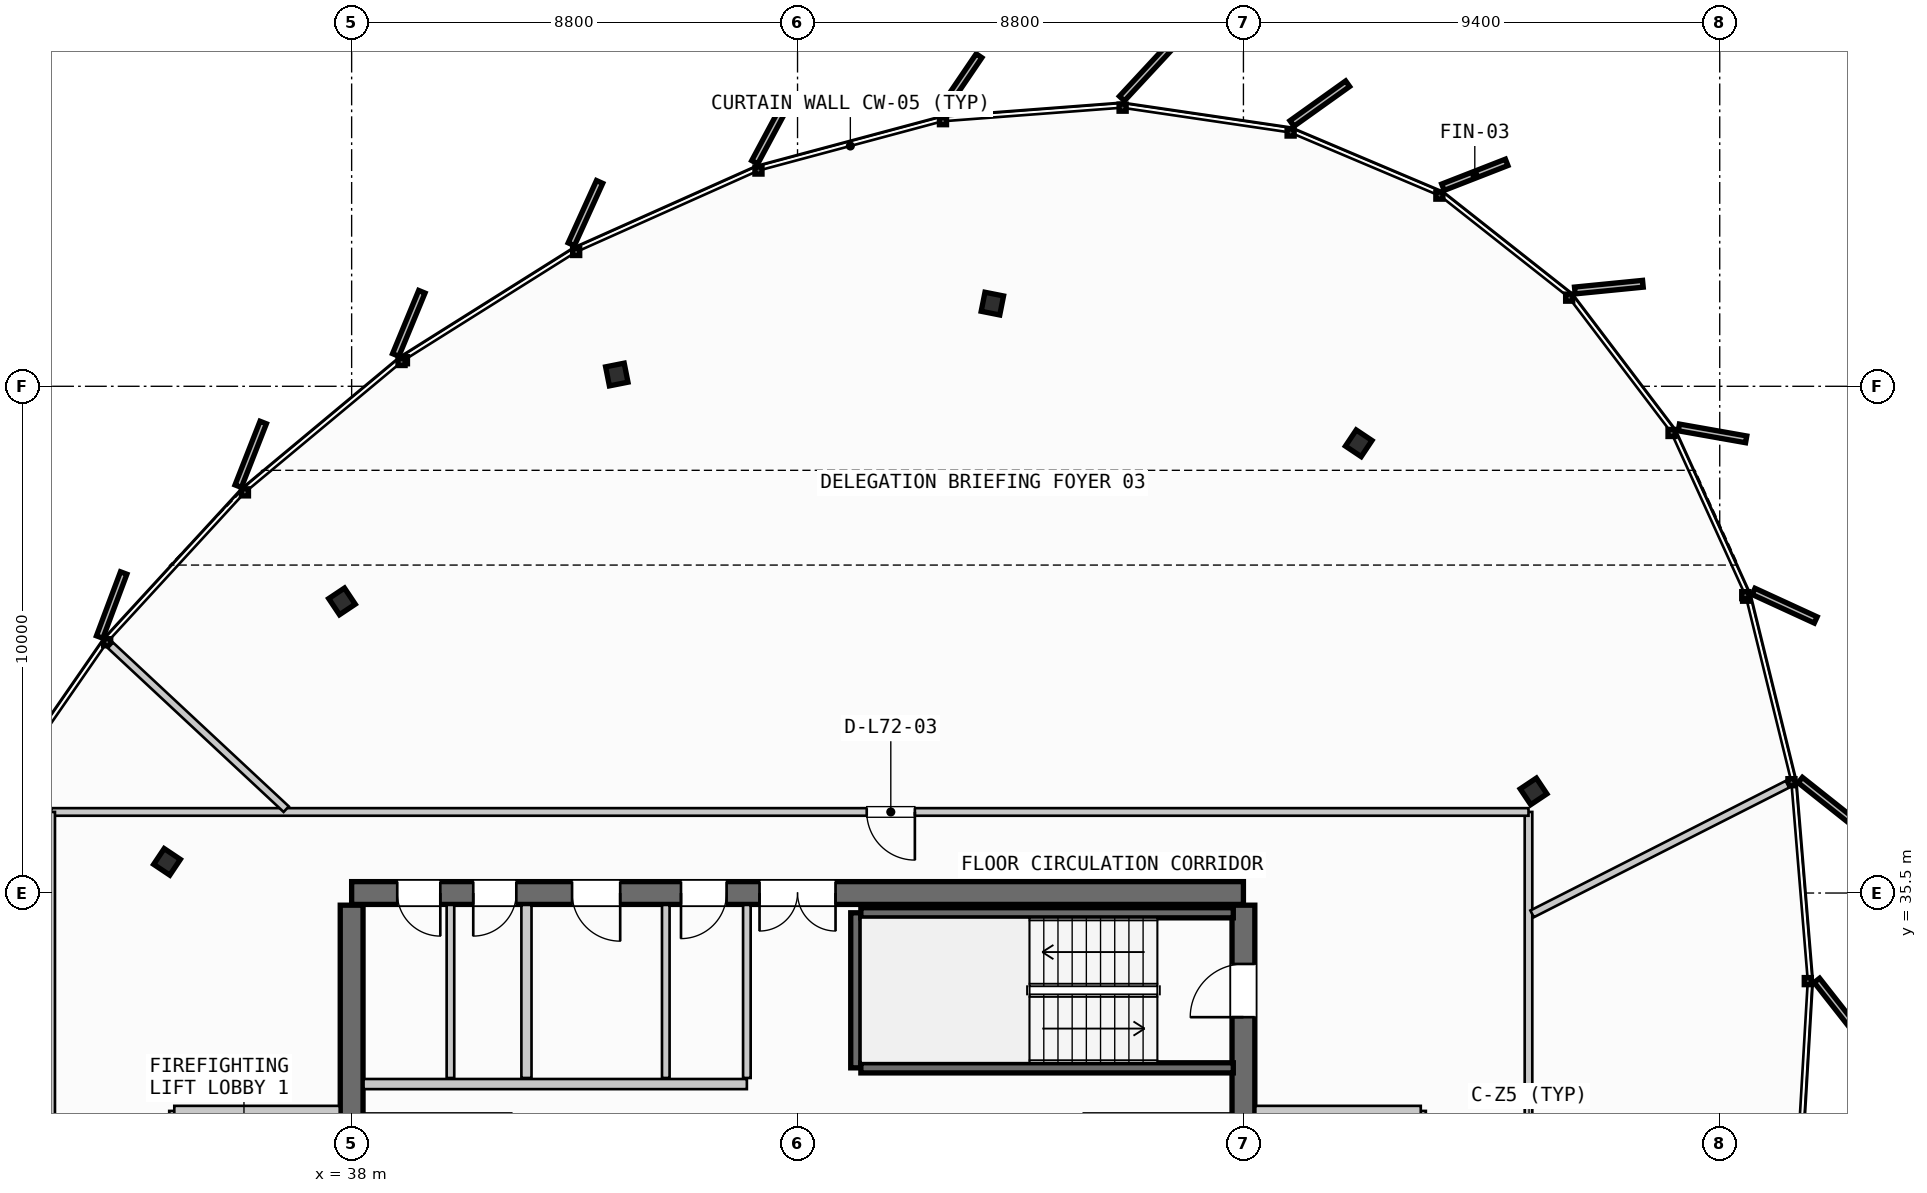
"""IFC4 building model, lengths in metres.
Left out: names, types, materials, properties, quantities, classifications, styles, units other than length and angle.
Written with IfcOpenShell. Run it as: python <this file> out.ifc"""

import sys

from ifc_helpers import new_model, si_unit, direction, frame, frame_2d, origin, origin_2d, place, context, subcontext, project, spatial, rectangle, i_section, extrude, source, transform, mapped, element, fill, save


model = new_model("IFC4")
c1 = context("Model", 3, precision=1e-05, world=origin(), true_north=direction((0.0, 1.0)))
c2 = subcontext(c1, "Body", "Model", "MODEL_VIEW")
j1 = project(units=[si_unit("LENGTHUNIT", "METRE"), si_unit("PLANEANGLEUNIT", "RADIAN")], contexts=[c1])
p1 = place(None, origin())
s1 = spatial("IfcSite", under=j1, at=p1, CompositionType="ELEMENT")
p2 = place(p1, origin())
s2 = spatial("IfcBuilding", under=s1, at=p2, CompositionType="ELEMENT")
p3 = place(p2, frame((0.0, 0.0, 273.25)))
s3 = spatial("IfcBuildingStorey", under=s2, at=p3, CompositionType="ELEMENT", Elevation=273.25)
p4 = place(p3, frame((55.6, 35.5, 0.0), z_axis=(0.0, 0.0, 1.0), x_axis=(-1.0, 0.0, 0.0)))
e1 = element("IfcWall", 1, at=p4, inside=s3, PredefinedType="SHEAR", context=c2, shape_type="SweptSolid", body=[
    extrude(rectangle(XDim=17.6, YDim=0.45, at=frame_2d((8.8, 0.0))), origin(), (0.0, 0.0, 1.0), 3.21),
])
p5 = place(p4, frame((8.05, 0.0, 0.0)))
e2 = element("IfcOpeningElement", 2, at=p5, cuts=e1, PredefinedType="OPENING", context=c2, shape_type="SweptSolid", body=[
    extrude(rectangle(XDim=1.5, YDim=2.2, at=frame_2d((0.75, 1.1))), frame((0.0, 0.235, 0.0), z_axis=(0.0, -1.0, 0.0), x_axis=(1.0, 0.0, 0.0)), (0.0, 0.0, 1.0), 0.47),
])
p6 = place(p4, frame((15.85, 0.0, 0.0)))
e3 = element("IfcOpeningElement", 3, at=p6, cuts=e1, PredefinedType="OPENING", context=c2, shape_type="SweptSolid", body=[
    extrude(rectangle(XDim=0.85, YDim=2.15, at=frame_2d((0.425, 1.075))), frame((0.0, 0.235, 0.0), z_axis=(0.0, -1.0, 0.0), x_axis=(1.0, 0.0, 0.0)), (0.0, 0.0, 1.0), 0.47),
])
p7 = place(p4, frame((14.35, 0.0, 0.0)))
e4 = element("IfcOpeningElement", 4, at=p7, cuts=e1, PredefinedType="OPENING", context=c2, shape_type="SweptSolid", body=[
    extrude(rectangle(XDim=0.85, YDim=2.15, at=frame_2d((0.425, 1.075))), frame((0.0, 0.235, 0.0), z_axis=(0.0, -1.0, 0.0), x_axis=(1.0, 0.0, 0.0)), (0.0, 0.0, 1.0), 0.47),
])
p8 = place(p4, frame((12.3, 0.0, 0.0)))
e5 = element("IfcOpeningElement", 5, at=p8, cuts=e1, PredefinedType="OPENING", context=c2, shape_type="SweptSolid", body=[
    extrude(rectangle(XDim=0.95, YDim=2.15, at=frame_2d((0.475, 1.075))), frame((0.0, 0.235, 0.0), z_axis=(0.0, -1.0, 0.0), x_axis=(1.0, 0.0, 0.0)), (0.0, 0.0, 1.0), 0.47),
])
p9 = place(p4, frame((10.2, 0.0, 0.0)))
e6 = element("IfcOpeningElement", 6, at=p9, cuts=e1, PredefinedType="OPENING", context=c2, shape_type="SweptSolid", body=[
    extrude(rectangle(XDim=0.9, YDim=2.15, at=frame_2d((0.45, 1.075))), frame((0.0, 0.235, 0.0), z_axis=(0.0, -1.0, 0.0), x_axis=(1.0, 0.0, 0.0)), (0.0, 0.0, 1.0), 0.47),
])
p10 = place(p3, frame((38.0, 35.26, 0.0), z_axis=(0.0, 0.0, 1.0), x_axis=(0.0, -1.0, 0.0)))
e7 = element("IfcWall", 7, at=p10, inside=s3, PredefinedType="SHEAR", context=c2, shape_type="SweptSolid", body=[
    extrude(rectangle(XDim=14.92, YDim=0.45, at=frame_2d((7.46, 0.0))), origin(), (0.0, 0.0, 1.0), 3.21),
])
p11 = place(p10, frame((5.21, 0.0, 0.0)))
e8 = element("IfcOpeningElement", 8, at=p11, cuts=e7, PredefinedType="OPENING", context=c2, shape_type="SweptSolid", body=[
    extrude(rectangle(XDim=1.1, YDim=2.2, at=frame_2d((0.55, 1.1))), frame((0.0, 0.235, 0.0), z_axis=(0.0, -1.0, 0.0), x_axis=(1.0, 0.0, 0.0)), (0.0, 0.0, 1.0), 0.47),
])
p12 = place(p3, frame((55.6, 20.34, 0.0), z_axis=(0.0, 0.0, 1.0), x_axis=(0.0, 1.0, 0.0)))
e9 = element("IfcWall", 9, at=p12, inside=s3, PredefinedType="SHEAR", context=c2, shape_type="SweptSolid", body=[
    extrude(rectangle(XDim=14.92, YDim=0.45, at=frame_2d((7.46, 0.0))), origin(), (0.0, 0.0, 1.0), 3.21),
])
p13 = place(p12, frame((12.71, 0.0, 0.0)))
e10 = element("IfcOpeningElement", 10, at=p13, cuts=e9, PredefinedType="OPENING", context=c2, shape_type="SweptSolid", body=[
    extrude(rectangle(XDim=1.05, YDim=2.15, at=frame_2d((0.525, 1.075))), frame((0.0, 0.235, 0.0), z_axis=(0.0, -1.0, 0.0), x_axis=(1.0, 0.0, 0.0)), (0.0, 0.0, 1.0), 0.47),
])
p14 = place(p12, frame((8.61, 0.0, 0.0)))
e11 = element("IfcOpeningElement", 11, at=p14, cuts=e9, PredefinedType="OPENING", context=c2, shape_type="SweptSolid", body=[
    extrude(rectangle(XDim=1.1, YDim=2.2, at=frame_2d((0.55, 1.1))), frame((0.0, 0.235, 0.0), z_axis=(0.0, -1.0, 0.0), x_axis=(1.0, 0.0, 0.0)), (0.0, 0.0, 1.0), 0.47),
])
m1 = source(origin(), c2, "Body", "SweptSolid", [
    extrude(i_section(OverallWidth=0.374, OverallDepth=0.383, WebThickness=0.017, FlangeThickness=0.026, FilletRadius=0.015, at=origin_2d()), origin(), (0.0, 0.0, 1.0), 3.21),
])
for number, where, z_axis, x_axis in (
    (12, (61.326, 37.506, 0.0), (0.0, 0.0, 1.0), (0.831, 0.556, 0.0)),
    (13, (57.875, 44.375, 0.0), (0.0, 0.0, 1.0), (0.556, 0.831, 0.0)),
    (14, (50.645, 47.132, 0.0), (0.0, 0.0, 1.0), (0.195, 0.981, 0.0)),
    (15, (43.233, 45.732, 0.0), (0.0, 0.0, 1.0), (-0.195, 0.981, 0.0)),
    (16, (37.81, 41.255, 0.0), (0.0, 0.0, 1.0), (-0.556, 0.831, 0.0)),
    (17, (34.356, 36.115, 0.0), (0.0, 0.0, 1.0), (-0.831, 0.556, 0.0)),
):
    element("IfcColumn", number, at=place(p3, frame(where, z_axis=z_axis, x_axis=x_axis)), inside=s3, PredefinedType="COLUMN", context=c2, shape_type="MappedRepresentation", body=[
        mapped(m1, transform((0.0, 0.0, 0.0), scale=1.0)),
    ])
p15 = place(p3, frame((47.95, 32.05, 0.0), z_axis=(0.0, 0.0, 1.0), x_axis=(0.0, 1.0, 0.0)))
e18 = element("IfcWall", 18, at=p15, inside=s3, PredefinedType="SHEAR", context=c2, shape_type="SweptSolid", body=[
    extrude(rectangle(XDim=3.06, YDim=0.2, at=frame_2d((1.53, 0.0))), origin(), (0.0, 0.0, 1.0), 3.21),
])
for number, where, z_axis, x_axis in (
    (19, (48.05, 35.11, 0.0), (0.0, 0.0, 1.0), (1.0, 0.0, 0.0)),
    (20, (55.4, 32.05, 0.0), (0.0, 0.0, 1.0), (-1.0, 0.0, 0.0)),
):
    element("IfcWall", number, at=place(p3, frame(where, z_axis=z_axis, x_axis=x_axis)), inside=s3, PredefinedType="SHEAR", context=c2, shape_type="SweptSolid", body=[
        extrude(rectangle(XDim=7.35, YDim=0.2, at=frame_2d((3.675, 0.0))), origin(), (0.0, 0.0, 1.0), 3.21),
    ])
p16 = place(p3, frame((38.235, 31.05, 0.0), z_axis=(0.0, 0.0, 1.0), x_axis=(1.0, 0.0, 0.0)))
e21 = element("IfcWall", 21, at=p16, inside=s3, PredefinedType="PARTITIONING", context=c2, shape_type="SweptSolid", body=[
    extrude(rectangle(XDim=2.915, YDim=0.2, at=frame_2d((1.458, 0.0))), origin(), (0.0, 0.0, 1.0), 2.595),
])
p17 = place(p3, frame((34.5, 31.2, 0.0), z_axis=(0.0, 0.0, 1.0), x_axis=(0.0, -1.0, 0.0)))
e22 = element("IfcWall", 22, at=p17, inside=s3, PredefinedType="PARTITIONING", context=c2, shape_type="SweptSolid", body=[
    extrude(rectangle(XDim=4.4, YDim=0.2, at=frame_2d((2.2, 0.0))), origin(), (0.0, 0.0, 1.0), 2.595),
])
p18 = place(p17, frame((1.65, 0.0, 0.0)))
e23 = element("IfcOpeningElement", 23, at=p18, cuts=e22, PredefinedType="OPENING", context=c2, shape_type="SweptSolid", body=[
    extrude(rectangle(XDim=1.05, YDim=2.15, at=frame_2d((0.525, 1.075))), frame((0.0, 0.11, 0.0), z_axis=(0.0, -1.0, 0.0), x_axis=(1.0, 0.0, 0.0)), (0.0, 0.0, 1.0), 0.22),
])
p19 = place(p3, frame((34.5, 31.2, 0.0), z_axis=(0.0, 0.0, 1.0), x_axis=(1.0, 0.0, 0.0)))
e24 = element("IfcWall", 24, at=p19, inside=s3, PredefinedType="PARTITIONING", context=c2, shape_type="SweptSolid", body=[
    extrude(rectangle(XDim=3.265, YDim=0.2, at=frame_2d((1.632, 0.0))), origin(), (0.0, 0.0, 1.0), 2.595),
])
p20 = place(p3, frame((52.45, 31.05, 0.0), z_axis=(0.0, 0.0, 1.0), x_axis=(1.0, 0.0, 0.0)))
e25 = element("IfcWall", 25, at=p20, inside=s3, PredefinedType="PARTITIONING", context=c2, shape_type="SweptSolid", body=[
    extrude(rectangle(XDim=2.915, YDim=0.2, at=frame_2d((1.458, 0.0))), origin(), (0.0, 0.0, 1.0), 2.595),
])
p21 = place(p3, frame((59.1, 26.8, 0.0), z_axis=(0.0, 0.0, 1.0), x_axis=(0.0, 1.0, 0.0)))
e26 = element("IfcWall", 26, at=p21, inside=s3, PredefinedType="PARTITIONING", context=c2, shape_type="SweptSolid", body=[
    extrude(rectangle(XDim=4.4, YDim=0.2, at=frame_2d((2.2, 0.0))), origin(), (0.0, 0.0, 1.0), 2.595),
])
p22 = place(p21, frame((1.65, 0.0, 0.0)))
e27 = element("IfcOpeningElement", 27, at=p22, cuts=e26, PredefinedType="OPENING", context=c2, shape_type="SweptSolid", body=[
    extrude(rectangle(XDim=1.05, YDim=2.15, at=frame_2d((0.525, 1.075))), frame((0.0, 0.11, 0.0), z_axis=(0.0, -1.0, 0.0), x_axis=(1.0, 0.0, 0.0)), (0.0, 0.0, 1.0), 0.22),
])
p23 = place(p3, frame((55.835, 31.2, 0.0), z_axis=(0.0, 0.0, 1.0), x_axis=(1.0, 0.0, 0.0)))
e28 = element("IfcWall", 28, at=p23, inside=s3, PredefinedType="PARTITIONING", context=c2, shape_type="SweptSolid", body=[
    extrude(rectangle(XDim=3.265, YDim=0.2, at=frame_2d((1.633, 0.0))), origin(), (0.0, 0.0, 1.0), 2.595),
])
p24 = place(p3, frame((41.45, 31.85, 0.0), z_axis=(0.0, 0.0, 1.0), x_axis=(0.0, 1.0, 0.0)))
e29 = element("IfcWall", 29, at=p24, inside=s3, PredefinedType="PARTITIONING", context=c2, shape_type="SweptSolid", body=[
    extrude(rectangle(XDim=3.415, YDim=0.2, at=frame_2d((1.708, 0.0))), origin(), (0.0, 0.0, 1.0), 2.595),
])
p25 = place(p3, frame((38.235, 31.73, 0.0), z_axis=(0.0, 0.0, 1.0), x_axis=(1.0, 0.0, 0.0)))
e30 = element("IfcWall", 30, at=p25, inside=s3, PredefinedType="PARTITIONING", context=c2, shape_type="SweptSolid", body=[
    extrude(rectangle(XDim=7.565, YDim=0.2, at=frame_2d((3.782, 0.0))), origin(), (0.0, 0.0, 1.0), 2.595),
])
for number, where, z_axis, x_axis in (
    (31, (45.8, 31.85, 0.0), (0.0, 0.0, 1.0), (0.0, 1.0, 0.0)),
    (32, (39.95, 31.85, 0.0), (0.0, 0.0, 1.0), (0.0, 1.0, 0.0)),
):
    element("IfcWall", number, at=place(p3, frame(where, z_axis=z_axis, x_axis=x_axis)), inside=s3, PredefinedType="PARTITIONING", context=c2, shape_type="SweptSolid", body=[
        extrude(rectangle(XDim=3.415, YDim=0.15, at=frame_2d((1.708, 0.0))), origin(), (0.0, 0.0, 1.0), 2.595),
    ])
p26 = place(p3, frame((44.2, 31.85, 0.0), z_axis=(0.0, 0.0, 1.0), x_axis=(0.0, 1.0, 0.0)))
e33 = element("IfcWall", 33, at=p26, inside=s3, PredefinedType="PLUMBINGWALL", context=c2, shape_type="SweptSolid", body=[
    extrude(rectangle(XDim=3.415, YDim=0.15, at=frame_2d((1.708, 0.0))), origin(), (0.0, 0.0, 1.0), 2.595),
])
p27 = place(p3, frame((61.226, 18.269, 0.0), z_axis=(0.0, 0.0, 1.0), x_axis=(0.0, 1.0, 0.0)))
e34 = element("IfcWall", 34, at=p27, inside=s3, PredefinedType="PARTITIONING", context=c2, shape_type="SweptSolid", body=[
    extrude(rectangle(XDim=18.831, YDim=0.15, at=frame_2d((9.416, 0.0))), origin(), (0.0, 0.0, 1.0), 2.595),
])
p28 = place(p27, frame((8.224, 0.0, 0.0)))
e35 = element("IfcOpeningElement", 35, at=p28, cuts=e34, PredefinedType="OPENING", context=c2, shape_type="SweptSolid", body=[
    extrude(rectangle(XDim=0.95, YDim=2.15, at=frame_2d((0.475, 1.075))), frame((0.0, 0.085, 0.0), z_axis=(0.0, -1.0, 0.0), x_axis=(1.0, 0.0, 0.0)), (0.0, 0.0, 1.0), 0.17),
])
p29 = place(p3, frame((61.226, 37.1, 0.0), z_axis=(0.0, 0.0, 1.0), x_axis=(-1.0, 0.0, 0.0)))
e36 = element("IfcWall", 36, at=p29, inside=s3, PredefinedType="PARTITIONING", context=c2, shape_type="SweptSolid", body=[
    extrude(rectangle(XDim=29.156, YDim=0.15, at=frame_2d((14.578, 0.0))), origin(), (0.0, 0.0, 1.0), 2.595),
])
p30 = place(p29, frame((12.11, 0.0, 0.0)))
e37 = element("IfcOpeningElement", 37, at=p30, cuts=e36, PredefinedType="OPENING", context=c2, shape_type="SweptSolid", body=[
    extrude(rectangle(XDim=0.95, YDim=2.15, at=frame_2d((0.475, 1.075))), frame((0.0, 0.085, 0.0), z_axis=(0.0, -1.0, 0.0), x_axis=(1.0, 0.0, 0.0)), (0.0, 0.0, 1.0), 0.17),
])
p31 = place(p3, frame((32.07, 37.1, 0.0), z_axis=(0.0, 0.0, 1.0), x_axis=(0.0, -1.0, 0.0)))
e38 = element("IfcWall", 38, at=p31, inside=s3, PredefinedType="PARTITIONING", context=c2, shape_type="SweptSolid", body=[
    extrude(rectangle(XDim=18.831, YDim=0.15, at=frame_2d((9.416, 0.0))), origin(), (0.0, 0.0, 1.0), 2.595),
])
p32 = place(p31, frame((7.894, 0.0, 0.0)))
e39 = element("IfcOpeningElement", 39, at=p32, cuts=e38, PredefinedType="OPENING", context=c2, shape_type="SweptSolid", body=[
    extrude(rectangle(XDim=0.95, YDim=2.15, at=frame_2d((0.475, 1.075))), frame((0.0, 0.085, 0.0), z_axis=(0.0, -1.0, 0.0), x_axis=(1.0, 0.0, 0.0)), (0.0, 0.0, 1.0), 0.17),
])
p33 = place(p3, frame((61.297, 35.089, 0.0), z_axis=(0.0, 0.0, 1.0), x_axis=(0.891723117969, 0.452581352774, 0.0)))
e40 = element("IfcWall", 40, at=p33, inside=s3, PredefinedType="PARTITIONING", context=c2, shape_type="SweptSolid", body=[
    extrude(rectangle(XDim=5.65, YDim=0.15, at=frame_2d((2.825, 0.0))), origin(), (0.0, 0.0, 1.0), 2.595),
])
p34 = place(p3, frame((36.709, 37.155, 0.0), z_axis=(0.0, 0.0, 1.0), x_axis=(-0.731440422575, 0.681905351367, 0.0)))
e41 = element("IfcWall", 41, at=p34, inside=s3, PredefinedType="PARTITIONING", context=c2, shape_type="SweptSolid", body=[
    extrude(rectangle(XDim=4.741, YDim=0.15, at=frame_2d((2.371, 0.0))), origin(), (0.0, 0.0, 1.0), 2.595),
])
m2 = source(origin(), c2, "Body", "SweptSolid", [
    extrude(rectangle(XDim=1.05, YDim=2.15, at=frame_2d((0.525, 1.075))), frame((0.0, 0.025, 0.0), z_axis=(0.0, -1.0, 0.0), x_axis=(1.0, 0.0, 0.0)), (0.0, 0.0, 1.0), 0.05),
])
p35 = place(p13, origin())
e42 = element("IfcDoor", 42, at=p35, inside=s3, OperationType="SINGLE_SWING_LEFT", PredefinedType="DOOR", context=c2, shape_type="MappedRepresentation", body=[
    mapped(m2, transform((0.0, 0.0, 0.0), scale=1.0)),
])
fill(e10, e42)
m3 = source(origin(), c2, "Body", "SweptSolid", [
    extrude(rectangle(XDim=1.5, YDim=2.2, at=frame_2d((0.75, 1.1))), frame((0.0, 0.025, 0.0), z_axis=(0.0, -1.0, 0.0), x_axis=(1.0, 0.0, 0.0)), (0.0, 0.0, 1.0), 0.05),
])
p36 = place(p5, origin())
e43 = element("IfcDoor", 43, at=p36, inside=s3, OperationType="DOUBLE_DOOR_SINGLE_SWING", PredefinedType="DOOR", context=c2, shape_type="MappedRepresentation", body=[
    mapped(m3, transform((0.0, 0.0, 0.0), scale=1.0)),
])
fill(e2, e43)
m4 = source(origin(), c2, "Body", "SweptSolid", [
    extrude(rectangle(XDim=0.85, YDim=2.15, at=frame_2d((0.425, 1.075))), frame((0.0, 0.025, 0.0), z_axis=(0.0, -1.0, 0.0), x_axis=(1.0, 0.0, 0.0)), (0.0, 0.0, 1.0), 0.05),
])
p37 = place(p6, origin())
e44 = element("IfcDoor", 44, at=p37, inside=s3, OperationType="SINGLE_SWING_LEFT", PredefinedType="DOOR", context=c2, shape_type="MappedRepresentation", body=[
    mapped(m4, transform((0.0, 0.0, 0.0), scale=1.0)),
])
fill(e3, e44)
p38 = place(p7, origin())
e45 = element("IfcDoor", 45, at=p38, inside=s3, OperationType="SINGLE_SWING_RIGHT", PredefinedType="DOOR", context=c2, shape_type="MappedRepresentation", body=[
    mapped(m4, transform((0.0, 0.0, 0.0), scale=1.0)),
])
fill(e4, e45)
m5 = source(origin(), c2, "Body", "SweptSolid", [
    extrude(rectangle(XDim=0.95, YDim=2.15, at=frame_2d((0.475, 1.075))), frame((0.0, 0.025, 0.0), z_axis=(0.0, -1.0, 0.0), x_axis=(1.0, 0.0, 0.0)), (0.0, 0.0, 1.0), 0.05),
])
p39 = place(p8, origin())
e46 = element("IfcDoor", 46, at=p39, inside=s3, OperationType="SINGLE_SWING_LEFT", PredefinedType="DOOR", context=c2, shape_type="MappedRepresentation", body=[
    mapped(m5, transform((0.0, 0.0, 0.0), scale=1.0)),
])
fill(e5, e46)
m6 = source(origin(), c2, "Body", "SweptSolid", [
    extrude(rectangle(XDim=0.9, YDim=2.15, at=frame_2d((0.45, 1.075))), frame((0.0, 0.025, 0.0), z_axis=(0.0, -1.0, 0.0), x_axis=(1.0, 0.0, 0.0)), (0.0, 0.0, 1.0), 0.05),
])
p40 = place(p9, origin())
e47 = element("IfcDoor", 47, at=p40, inside=s3, OperationType="SINGLE_SWING_RIGHT", PredefinedType="DOOR", context=c2, shape_type="MappedRepresentation", body=[
    mapped(m6, transform((0.0, 0.0, 0.0), scale=1.0)),
])
fill(e6, e47)
p41 = place(p30, origin())
e48 = element("IfcDoor", 48, at=p41, inside=s3, OperationType="SINGLE_SWING_LEFT", PredefinedType="DOOR", context=c2, shape_type="MappedRepresentation", body=[
    mapped(m5, transform((0.0, 0.0, 0.0), scale=1.0)),
])
fill(e37, e48)
save(model, sys.argv[1])
